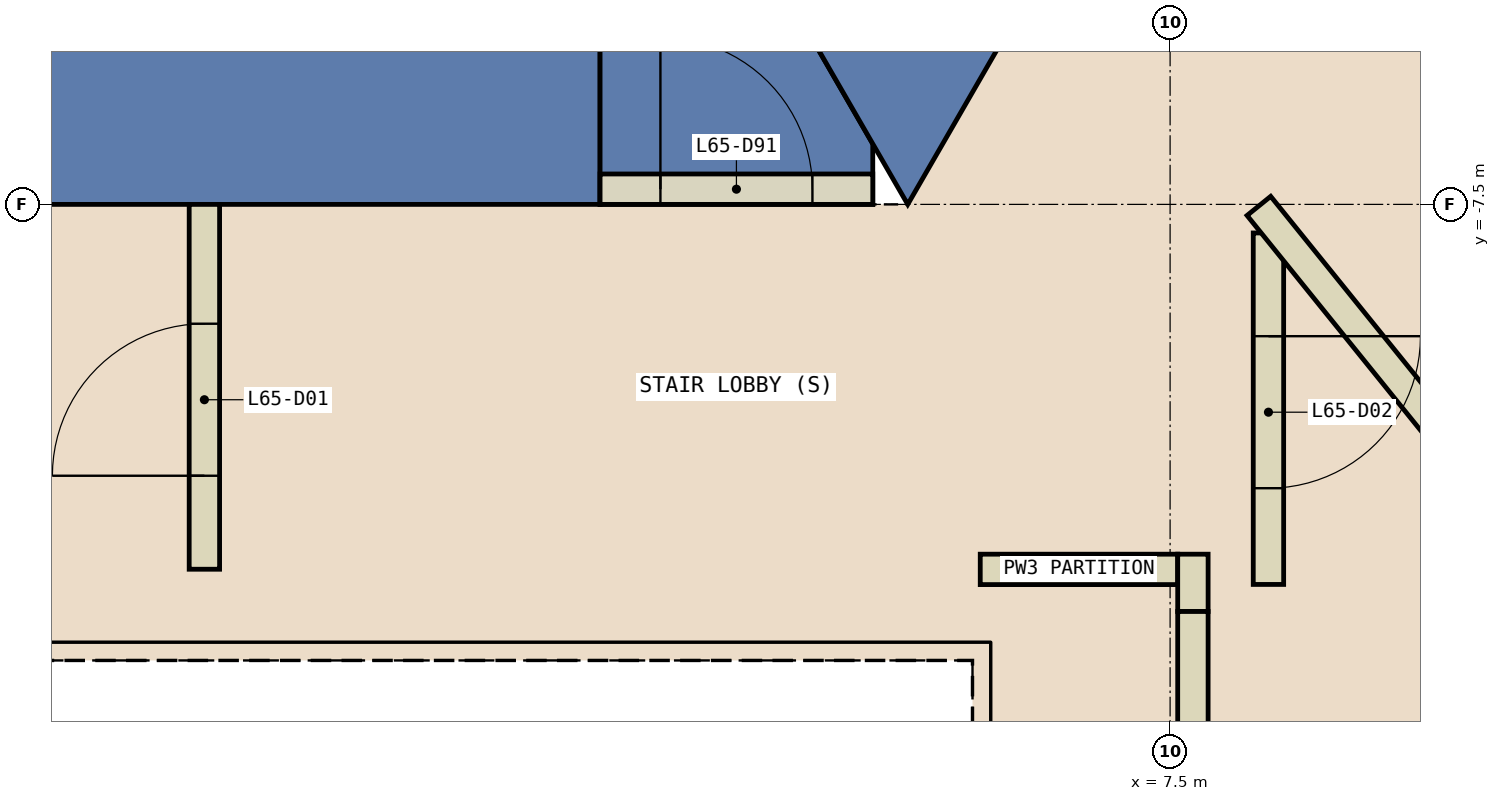
"""IFC4 building model, lengths in metres.
Left out: names, types, materials, properties, quantities, classifications, styles, units other than length and angle.
Written with IfcOpenShell. Run it as: python <this file> out.ifc"""

import sys

from ifc_helpers import new_model, si_unit, direction, frame, frame_2d, origin, place, context, subcontext, project, spatial, polyline, rectangle, outline, extrude, element, fill, save


model = new_model("IFC4")
c1 = context("Model", 3, precision=1e-05, world=origin(), true_north=direction((0.0, 1.0)))
c2 = subcontext(c1, "Body", "Model", "MODEL_VIEW")
j1 = project(units=[si_unit("LENGTHUNIT", "METRE"), si_unit("PLANEANGLEUNIT", "RADIAN")], contexts=[c1])
p1 = place(None, origin())
s1 = spatial("IfcSite", under=j1, at=p1, CompositionType="ELEMENT")
p2 = place(p1, origin())
s2 = spatial("IfcBuilding", under=s1, at=p2, CompositionType="ELEMENT")
p3 = place(p2, frame((0.0, 0.0, 281.0)))
s3 = spatial("IfcBuildingStorey", under=s2, at=p3, CompositionType="ELEMENT", Elevation=281.0)
p4 = place(p3, frame((0.0, 0.0, -0.6)))
e1 = element("IfcWall", 1, at=p4, inside=s3, PredefinedType="SHEAR", context=c2, shape_type="SweptSolid", body=[
    extrude(outline(polyline([(3.75, -7.5), (3.75, -5.5), (-4.619, -5.5), (-5.774, -7.5), (3.75, -7.5)])), origin(), (0.0, 0.0, 1.0), 5.4),
])
p5 = place(p3, frame((0.0, 0.0, 3.6)))
e2 = element("IfcWall", 2, at=p5, inside=s3, PredefinedType="SHEAR", context=c2, shape_type="SweptSolid", body=[
    extrude(outline(polyline([(5.544, -7.5), (5.544, -7.102), (4.619, -5.5), (3.75, -5.5), (3.75, -7.5), (5.544, -7.5)])), origin(), (0.0, 0.0, 1.0), 1.2),
])
p6 = place(p3, frame((0.0, 0.0, -0.6)))
e3 = element("IfcWall", 3, at=p6, inside=s3, PredefinedType="SHEAR", context=c2, shape_type="SweptSolid", body=[
    extrude(outline(polyline([(5.774, -7.5), (11.547, 2.5), (9.238, 2.5), (4.619, -5.5), (5.774, -7.5)])), origin(), (0.0, 0.0, 1.0), 5.4),
])
p7 = place(p3, frame((7.578, -4.375, 0.0), z_axis=(0.0, 0.0, 1.0), x_axis=(0.866020754303, -0.500008053052, 0.0)))
e4 = element("IfcWall", 4, at=p7, inside=s3, PredefinedType="SHEAR", context=c2, shape_type="SweptSolid", body=[
    extrude(rectangle(XDim=20.374, YDim=1.0, at=frame_2d((10.187, 0.0))), origin(), (0.0, 0.0, 1.0), 4.8),
])
p8 = place(p3, frame((1.147, -9.9, 0.0), z_axis=(0.0, 0.0, 1.0), x_axis=(0.0, 1.0, 0.0)))
e5 = element("IfcWall", 5, at=p8, inside=s3, PredefinedType="PARTITIONING", context=c2, shape_type="SweptSolid", body=[
    extrude(rectangle(XDim=2.4, YDim=0.2, at=frame_2d((1.2, 0.0))), origin(), (0.0, 0.0, 1.0), 4.8),
])
p9 = place(p8, frame((0.615, 0.0, 0.0)))
e6 = element("IfcOpeningElement", 6, at=p9, cuts=e5, PredefinedType="OPENING", context=c2, shape_type="SweptSolid", body=[
    extrude(rectangle(XDim=1.0, YDim=2.1, at=frame_2d((0.5, 1.05))), frame((0.0, 0.11, 0.0), z_axis=(0.0, -1.0, 0.0), x_axis=(1.0, 0.0, 0.0)), (0.0, 0.0, 1.0), 0.22),
])
p10 = place(p3, frame((6.251, -9.901, 0.0), z_axis=(0.0, 0.0, 1.0), x_axis=(1.0, 0.0, 0.0)))
e7 = element("IfcWall", 7, at=p10, inside=s3, PredefinedType="PARTITIONING", context=c2, shape_type="SweptSolid", body=[
    extrude(rectangle(XDim=1.299, YDim=0.2, at=frame_2d((0.649, 0.0))), origin(), (0.0, 0.0, 1.0), 2.4),
])
p11 = place(p3, frame((8.147, -7.688, 0.0), z_axis=(0.0, 0.0, 1.0), x_axis=(0.0, -1.0, 0.0)))
e8 = element("IfcWall", 8, at=p11, inside=s3, PredefinedType="PARTITIONING", context=c2, shape_type="SweptSolid", body=[
    extrude(rectangle(XDim=2.312, YDim=0.2, at=frame_2d((1.156, 0.0))), origin(), (0.0, 0.0, 1.0), 4.8),
])
p12 = place(p11, frame((0.679, 0.0, 0.0)))
e9 = element("IfcOpeningElement", 9, at=p12, cuts=e8, PredefinedType="OPENING", context=c2, shape_type="SweptSolid", body=[
    extrude(rectangle(XDim=1.0, YDim=2.1, at=frame_2d((0.5, 1.05))), frame((0.0, 0.11, 0.0), z_axis=(0.0, -1.0, 0.0), x_axis=(1.0, 0.0, 0.0)), (0.0, 0.0, 1.0), 0.22),
])
p13 = place(p3, frame((7.65, -9.801, 0.0), z_axis=(0.0, 0.0, 1.0), x_axis=(0.0, -1.0, 0.0)))
e10 = element("IfcWall", 10, at=p13, inside=s3, PredefinedType="PARTITIONING", context=c2, shape_type="SweptSolid", body=[
    extrude(rectangle(XDim=0.377, YDim=0.2, at=frame_2d((0.188, 0.0))), origin(), (0.0, 0.0, 1.0), 2.4),
])
p14 = place(p3, frame((8.084, -7.51, 0.0), z_axis=(0.0, 0.0, 1.0), x_axis=(0.628300137945, -0.777971038445, 0.0)))
e11 = element("IfcWall", 11, at=p14, inside=s3, PredefinedType="PARTITIONING", context=c2, shape_type="SweptSolid", body=[
    extrude(rectangle(XDim=16.141, YDim=0.2, at=frame_2d((8.07, 0.0))), origin(), (0.0, 0.0, 1.0), 4.8),
])
p15 = place(p14, frame((8.163, 0.0, 0.0)))
e12 = element("IfcOpeningElement", 12, at=p15, cuts=e11, PredefinedType="OPENING", context=c2, shape_type="SweptSolid", body=[
    extrude(rectangle(XDim=1.0, YDim=2.1, at=frame_2d((0.5, 1.05))), frame((0.0, 0.11, 0.0), z_axis=(0.0, -1.0, 0.0), x_axis=(1.0, 0.0, 0.0)), (0.0, 0.0, 1.0), 0.22),
])
p16 = place(p3, frame((3.75, -7.4, 0.0), z_axis=(0.0, 0.0, 1.0), x_axis=(1.0, 0.0, 0.0)))
e13 = element("IfcWall", 13, at=p16, inside=s3, PredefinedType="PARTITIONING", context=c2, shape_type="SweptSolid", body=[
    extrude(rectangle(XDim=1.794, YDim=0.2, at=frame_2d((0.897, 0.0))), origin(), (0.0, 0.0, 1.0), 2.4),
])
p17 = place(p16, frame((0.397, 0.0, 0.0)))
e14 = element("IfcOpeningElement", 14, at=p17, cuts=e13, PredefinedType="OPENING", context=c2, shape_type="SweptSolid", body=[
    extrude(rectangle(XDim=1.0, YDim=2.1, at=frame_2d((0.5, 1.05))), frame((0.0, 0.11, 0.0), z_axis=(0.0, -1.0, 0.0), x_axis=(1.0, 0.0, 0.0)), (0.0, 0.0, 1.0), 0.22),
])
p18 = place(p3, frame((7.65, -10.178, 0.0), z_axis=(0.0, 0.0, 1.0), x_axis=(0.0, -1.0, 0.0)))
e15 = element("IfcWall", 15, at=p18, inside=s3, PredefinedType="PARTITIONING", context=c2, shape_type="SweptSolid", body=[
    extrude(rectangle(XDim=4.551, YDim=0.2, at=frame_2d((2.275, 0.0))), origin(), (0.0, 0.0, 1.0), 4.8),
])
p19 = place(p9, origin())
e16 = element("IfcDoor", 16, at=p19, inside=s3, OperationType="SINGLE_SWING_RIGHT", PredefinedType="DOOR", context=c2, shape_type="SweptSolid", body=[
    extrude(rectangle(XDim=1.0, YDim=2.1, at=frame_2d((0.5, 1.05))), frame((0.0, 0.025, 0.0), z_axis=(0.0, -1.0, 0.0), x_axis=(1.0, 0.0, 0.0)), (0.0, 0.0, 1.0), 0.05),
])
fill(e6, e16)
p20 = place(p12, origin())
e17 = element("IfcDoor", 17, at=p20, inside=s3, OperationType="SINGLE_SWING_LEFT", PredefinedType="DOOR", context=c2, shape_type="SweptSolid", body=[
    extrude(rectangle(XDim=1.0, YDim=2.1, at=frame_2d((0.5, 1.05))), frame((0.0, 0.025, 0.0), z_axis=(0.0, -1.0, 0.0), x_axis=(1.0, 0.0, 0.0)), (0.0, 0.0, 1.0), 0.05),
])
fill(e9, e17)
p21 = place(p17, origin())
e18 = element("IfcDoor", 18, at=p21, inside=s3, OperationType="SINGLE_SWING_LEFT", PredefinedType="DOOR", context=c2, shape_type="SweptSolid", body=[
    extrude(rectangle(XDim=1.0, YDim=2.1, at=frame_2d((0.5, 1.05))), frame((0.0, 0.025, 0.0), z_axis=(0.0, -1.0, 0.0), x_axis=(1.0, 0.0, 0.0)), (0.0, 0.0, 1.0), 0.05),
])
fill(e14, e18)
save(model, sys.argv[1])
